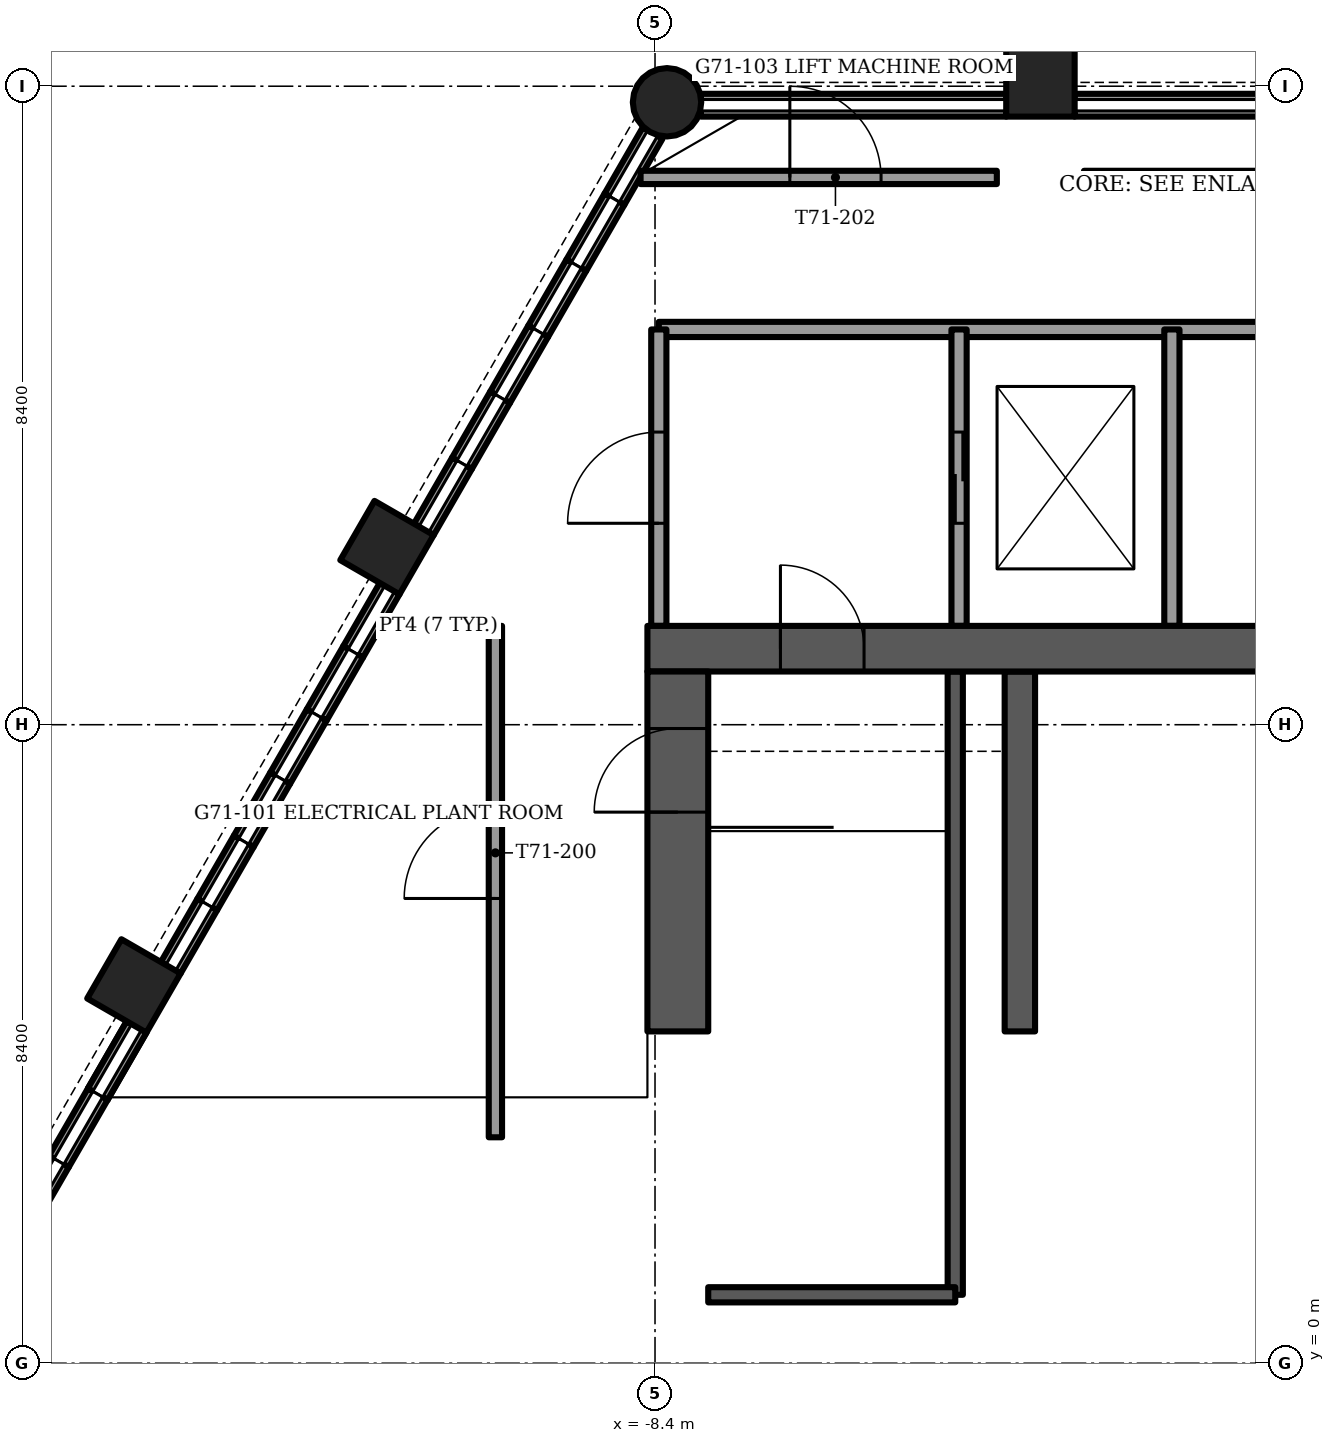
"""IFC4 building model, lengths in metres.
Left out: names, types, materials, properties, quantities, classifications, styles, units other than length and angle.
Written with IfcOpenShell. Run it as: python <this file> out.ifc"""

import sys

from ifc_helpers import new_model, si_unit, direction, frame, frame_2d, origin, origin_2d, place, context, subcontext, project, spatial, rectangle, circle, extrude, element, fill, save


model = new_model("IFC4")
c1 = context("Model", 3, precision=1e-05, world=origin(), true_north=direction((0.0, 1.0)))
c2 = subcontext(c1, "Body", "Model", "MODEL_VIEW")
j1 = project(units=[si_unit("LENGTHUNIT", "METRE"), si_unit("PLANEANGLEUNIT", "RADIAN")], contexts=[c1])
p1 = place(None, origin())
s1 = spatial("IfcSite", under=j1, at=p1, CompositionType="ELEMENT")
p2 = place(p1, origin())
s2 = spatial("IfcBuilding", under=s1, at=p2, CompositionType="ELEMENT")
p3 = place(p2, frame((0.0, 0.0, 288.5)))
s3 = spatial("IfcBuildingStorey", under=s2, at=p3, CompositionType="ELEMENT", Elevation=288.5)
p4 = place(p3, frame((-8.5, 9.4, -0.3), z_axis=(0.0, 0.0, 1.0), x_axis=(1.0, 0.0, 0.0)))
e1 = element("IfcWall", 1, at=p4, inside=s3, PredefinedType="SHEAR", context=c2, shape_type="SweptSolid", body=[
    extrude(rectangle(XDim=17.0, YDim=0.6, at=frame_2d((8.5, 0.0))), origin(), (0.0, 0.0, 1.0), 4.5),
])
p5 = place(p4, frame((1.75, 0.0, 0.0)))
e2 = element("IfcOpeningElement", 2, at=p5, cuts=e1, PredefinedType="OPENING", context=c2, shape_type="SweptSolid", body=[
    extrude(rectangle(XDim=1.1, YDim=2.1, at=frame_2d((0.55, 1.05))), frame((0.0, 0.3, 0.0), z_axis=(0.0, -1.0, 0.0), x_axis=(1.0, 0.0, 0.0)), (0.0, 0.0, 1.0), 0.6),
])
p6 = place(p4, frame((14.15, 0.0, 0.0)))
e3 = element("IfcOpeningElement", 3, at=p6, cuts=e1, PredefinedType="OPENING", context=c2, shape_type="SweptSolid", body=[
    extrude(rectangle(XDim=1.1, YDim=2.1, at=frame_2d((0.55, 1.05))), frame((0.0, 0.3, 0.0), z_axis=(0.0, -1.0, 0.0), x_axis=(1.0, 0.0, 0.0)), (0.0, 0.0, 1.0), 0.6),
])
p7 = place(p3, frame((-8.1, 4.365, -0.3), z_axis=(0.0, 0.0, 1.0), x_axis=(0.0, 1.0, 0.0)))
e4 = element("IfcWall", 4, at=p7, inside=s3, PredefinedType="SHEAR", context=c2, shape_type="SweptSolid", body=[
    extrude(rectangle(XDim=4.735, YDim=0.8, at=frame_2d((2.368, 0.0))), origin(), (0.0, 0.0, 1.0), 4.5),
])
p8 = place(p7, frame((2.885, 0.0, 0.0)))
e5 = element("IfcOpeningElement", 5, at=p8, cuts=e4, PredefinedType="OPENING", context=c2, shape_type="SweptSolid", body=[
    extrude(rectangle(XDim=1.1, YDim=2.1, at=frame_2d((0.55, 1.05))), frame((0.0, 0.4, 0.0), z_axis=(0.0, -1.0, 0.0), x_axis=(1.0, 0.0, 0.0)), (0.0, 0.0, 1.0), 0.8),
])
p9 = place(p3, frame((-3.6, 4.365, -0.3), z_axis=(0.0, 0.0, 1.0), x_axis=(0.0, 1.0, 0.0)))
e6 = element("IfcWall", 6, at=p9, inside=s3, PredefinedType="SHEAR", context=c2, shape_type="SweptSolid", body=[
    extrude(rectangle(XDim=4.735, YDim=0.4, at=frame_2d((2.368, 0.0))), origin(), (0.0, 0.0, 1.0), 4.5),
])
p10 = place(p3, frame((-8.242, 16.589, -1.2), z_axis=(0.0, 0.0, 1.0), x_axis=(1.0, 0.0, 0.0)))
e7 = element("IfcColumn", 7, at=p10, inside=s3, PredefinedType="COLUMN", context=c2, shape_type="SweptSolid", body=[
    extrude(circle(Radius=0.45, at=origin_2d()), origin(), (0.0, 0.0, 1.0), 4.5),
])
for number, where, z_axis, x_axis in (
    (8, (-3.329, 16.85, -1.2), (0.0, 0.0, 1.0), (1.0, 0.0, 0.0)),
    (9, (-11.926, 10.73, -1.2), (0.0, 0.0, 1.0), (0.5, 0.866, 0.0)),
    (10, (-15.256, 4.963, -1.2), (0.0, 0.0, 1.0), (0.5, 0.866, 0.0)),
):
    element("IfcColumn", number, at=place(p3, frame(where, z_axis=z_axis, x_axis=x_axis)), inside=s3, PredefinedType="COLUMN", context=c2, shape_type="SweptSolid", body=[
        extrude(rectangle(XDim=0.9, YDim=0.9, at=origin_2d()), origin(), (0.0, 0.0, 1.0), 4.5),
    ])
p11 = place(p3, frame((2.879, 16.55, 0.0), z_axis=(0.0, 0.0, 1.0), x_axis=(-1.0, 0.0, 0.0)))
e11 = element("IfcWall", 11, at=p11, inside=s3, PredefinedType="SOLIDWALL", context=c2, shape_type="SweptSolid", body=[
    extrude(rectangle(XDim=5.759, YDim=0.3, at=frame_2d((2.879, 0.0))), origin(), (0.0, 0.0, 1.0), 1.0),
])
p12 = place(p3, frame((-3.779, 16.55, 0.0), z_axis=(0.0, 0.0, 1.0), x_axis=(-1.0, 0.0, 0.0)))
e12 = element("IfcWall", 12, at=p12, inside=s3, PredefinedType="SOLIDWALL", context=c2, shape_type="SweptSolid", body=[
    extrude(rectangle(XDim=4.017, YDim=0.3, at=frame_2d((2.008, 0.0))), origin(), (0.0, 0.0, 1.0), 1.0),
])
p13 = place(p3, frame((-8.432, 16.182, 0.0), z_axis=(0.0, 0.0, 1.0), x_axis=(-0.500143783026, -0.865942374699, 0.0)))
e13 = element("IfcWall", 13, at=p13, inside=s3, PredefinedType="SOLIDWALL", context=c2, shape_type="SweptSolid", body=[
    extrude(rectangle(XDim=1.003, YDim=0.3, at=frame_2d((0.501, 0.0))), origin(), (0.0, 0.0, 1.0), 1.0),
])
p14 = place(p3, frame((-8.934, 15.314, 0.0), z_axis=(0.0, 0.0, 1.0), x_axis=(-0.500038395149, -0.8660032352, 0.0)))
e14 = element("IfcWall", 14, at=p14, inside=s3, PredefinedType="SOLIDWALL", context=c2, shape_type="SweptSolid", body=[
    extrude(rectangle(XDim=1.003, YDim=0.3, at=frame_2d((0.502, 0.0))), origin(), (0.0, 0.0, 1.0), 1.0),
])
p15 = place(p3, frame((-9.435, 14.445, 0.0), z_axis=(0.0, 0.0, 1.0), x_axis=(-0.499961250474, -0.866047774678, 0.0)))
e15 = element("IfcWall", 15, at=p15, inside=s3, PredefinedType="SOLIDWALL", context=c2, shape_type="SweptSolid", body=[
    extrude(rectangle(XDim=1.003, YDim=0.3, at=frame_2d((0.501, 0.0))), origin(), (0.0, 0.0, 1.0), 1.0),
])
for number, where, z_axis, x_axis in (
    (16, (-9.937, 13.576, 0.0), (0.0, 0.0, 1.0), (-0.5, -0.866, 0.0)),
    (17, (-10.438, 12.707, 0.0), (0.0, 0.0, 1.0), (-0.5, -0.866, 0.0)),
    (18, (-10.94, 11.839, 0.0), (0.0, 0.0, 1.0), (-0.5, -0.866, 0.0)),
):
    element("IfcWall", number, at=place(p3, frame(where, z_axis=z_axis, x_axis=x_axis)), inside=s3, PredefinedType="SOLIDWALL", context=c2, shape_type="SweptSolid", body=[
        extrude(rectangle(XDim=1.003, YDim=0.3, at=frame_2d((0.501, 0.0))), origin(), (0.0, 0.0, 1.0), 1.0),
    ])
for number, where, z_axis, x_axis in (
    (19, (-11.892, 10.19, 0.0), (0.0, 0.0, 1.0), (-0.5, -0.866, 0.0)),
    (20, (-12.371, 9.359, 0.0), (0.0, 0.0, 1.0), (-0.5, -0.866, 0.0)),
):
    element("IfcWall", number, at=place(p3, frame(where, z_axis=z_axis, x_axis=x_axis)), inside=s3, PredefinedType="SOLIDWALL", context=c2, shape_type="SweptSolid", body=[
        extrude(rectangle(XDim=0.96, YDim=0.3, at=frame_2d((0.48, 0.0))), origin(), (0.0, 0.0, 1.0), 1.0),
    ])
p16 = place(p3, frame((-12.851, 8.528, 0.0), z_axis=(0.0, 0.0, 1.0), x_axis=(-0.500023335103, -0.866011930837, 0.0)))
e21 = element("IfcWall", 21, at=p16, inside=s3, PredefinedType="SOLIDWALL", context=c2, shape_type="SweptSolid", body=[
    extrude(rectangle(XDim=0.96, YDim=0.3, at=frame_2d((0.48, 0.0))), origin(), (0.0, 0.0, 1.0), 1.0),
])
p17 = place(p3, frame((-13.331, 7.697, 0.0), z_axis=(0.0, 0.0, 1.0), x_axis=(-0.499832553123, -0.866122057702, 0.0)))
e22 = element("IfcWall", 22, at=p17, inside=s3, PredefinedType="SOLIDWALL", context=c2, shape_type="SweptSolid", body=[
    extrude(rectangle(XDim=0.96, YDim=0.3, at=frame_2d((0.48, 0.0))), origin(), (0.0, 0.0, 1.0), 1.0),
])
p18 = place(p3, frame((-13.811, 6.865, 0.0), z_axis=(0.0, 0.0, 1.0), x_axis=(-0.500023335103, -0.866011930837, 0.0)))
e23 = element("IfcWall", 23, at=p18, inside=s3, PredefinedType="SOLIDWALL", context=c2, shape_type="SweptSolid", body=[
    extrude(rectangle(XDim=0.96, YDim=0.3, at=frame_2d((0.48, 0.0))), origin(), (0.0, 0.0, 1.0), 1.0),
])
p19 = place(p3, frame((-14.291, 6.034, 0.0), z_axis=(0.0, 0.0, 1.0), x_axis=(-0.500133489192, -0.865948320045, 0.0)))
e24 = element("IfcWall", 24, at=p19, inside=s3, PredefinedType="SOLIDWALL", context=c2, shape_type="SweptSolid", body=[
    extrude(rectangle(XDim=0.96, YDim=0.3, at=frame_2d((0.48, 0.0))), origin(), (0.0, 0.0, 1.0), 1.0),
])
p20 = place(p3, frame((-15.221, 4.424, 0.0), z_axis=(0.0, 0.0, 1.0), x_axis=(-0.500046605208, -0.865998494583, 0.0)))
e25 = element("IfcWall", 25, at=p20, inside=s3, PredefinedType="SOLIDWALL", context=c2, shape_type="SweptSolid", body=[
    extrude(rectangle(XDim=1.021, YDim=0.3, at=frame_2d((0.511, 0.0))), origin(), (0.0, 0.0, 1.0), 1.0),
])
p21 = place(p3, frame((-15.221, 4.424, 3.3), z_axis=(0.0, 0.0, 1.0), x_axis=(-0.500046605208, -0.865998494583, 0.0)))
e26 = element("IfcWall", 26, at=p21, inside=s3, PredefinedType="SOLIDWALL", context=c2, shape_type="SweptSolid", body=[
    extrude(rectangle(XDim=1.021, YDim=0.3, at=frame_2d((0.511, 0.0))), origin(), (0.0, 0.0, 1.0), 0.839),
])
for number, where, z_axis, x_axis in (
    (27, (-15.732, 3.539, 0.0), (0.0, 0.0, 1.0), (-0.5, -0.866, 0.0)),
    (28, (-16.242, 2.654, 0.0), (0.0, 0.0, 1.0), (-0.5, -0.866, 0.0)),
):
    element("IfcWall", number, at=place(p3, frame(where, z_axis=z_axis, x_axis=x_axis)), inside=s3, PredefinedType="SOLIDWALL", context=c2, shape_type="SweptSolid", body=[
        extrude(rectangle(XDim=1.021, YDim=0.3, at=frame_2d((0.511, 0.0))), origin(), (0.0, 0.0, 1.0), 1.0),
    ])
p22 = place(p3, frame((-11.996, 9.7, 0.0), z_axis=(0.0, 0.0, 1.0), x_axis=(1.0, 0.0, 0.0)))
e29 = element("IfcWall", 29, at=p22, inside=s3, PredefinedType="PARTITIONING", context=c2, shape_type="SweptSolid", body=[
    extrude(rectangle(XDim=1.496, YDim=0.175, at=frame_2d((0.748, 0.0))), origin(), (0.0, 0.0, 1.0), 4.2),
])
p23 = place(p3, frame((-8.59, 15.6, 0.0), z_axis=(0.0, 0.0, 1.0), x_axis=(1.0, 0.0, 0.0)))
e30 = element("IfcWall", 30, at=p23, inside=s3, PredefinedType="PARTITIONING", context=c2, shape_type="SweptSolid", body=[
    extrude(rectangle(XDim=4.687, YDim=0.175, at=frame_2d((2.344, 0.0))), origin(), (0.0, 0.0, 1.0), 4.2),
])
p24 = place(p23, frame((1.964, 0.0, 0.0)))
e31 = element("IfcOpeningElement", 31, at=p24, cuts=e30, PredefinedType="OPENING", context=c2, shape_type="SweptSolid", body=[
    extrude(rectangle(XDim=1.2, YDim=2.1, at=frame_2d((0.6, 1.05))), frame((0.0, 0.087, 0.0), z_axis=(0.0, -1.0, 0.0), x_axis=(1.0, 0.0, 0.0)), (0.0, 0.0, 1.0), 0.175),
])
p25 = place(p3, frame((-2.756, 15.6, 0.0), z_axis=(0.0, 0.0, 1.0), x_axis=(1.0, 0.0, 0.0)))
e32 = element("IfcWall", 32, at=p25, inside=s3, PredefinedType="PARTITIONING", context=c2, shape_type="SweptSolid", body=[
    extrude(rectangle(XDim=5.512, YDim=0.175, at=frame_2d((2.756, 0.0))), origin(), (0.0, 0.0, 1.0), 4.2),
])
p26 = place(p3, frame((-10.5, 2.972, 0.0), z_axis=(0.0, 0.0, 1.0), x_axis=(0.0, 1.0, 0.0)))
e33 = element("IfcWall", 33, at=p26, inside=s3, PredefinedType="PARTITIONING", context=c2, shape_type="SweptSolid", body=[
    extrude(rectangle(XDim=6.728, YDim=0.175, at=frame_2d((3.364, 0.0))), origin(), (0.0, 0.0, 1.0), 4.155),
])
p27 = place(p26, frame((3.142, 0.0, 0.0)))
e34 = element("IfcOpeningElement", 34, at=p27, cuts=e33, PredefinedType="OPENING", context=c2, shape_type="SweptSolid", body=[
    extrude(rectangle(XDim=1.2, YDim=2.1, at=frame_2d((0.6, 1.05))), frame((0.0, 0.087, 0.0), z_axis=(0.0, -1.0, 0.0), x_axis=(1.0, 0.0, 0.0)), (0.0, 0.0, 1.0), 0.175),
])
p28 = place(p3, frame((-4.45, 0.9, -0.3), z_axis=(0.0, 0.0, 1.0), x_axis=(0.0, 1.0, 0.0)))
e35 = element("IfcWall", 35, at=p28, inside=s3, PredefinedType="SOLIDWALL", context=c2, shape_type="SweptSolid", body=[
    extrude(rectangle(XDim=8.2, YDim=0.2, at=frame_2d((4.1, 0.0))), origin(), (0.0, 0.0, 1.0), 4.5),
])
p29 = place(p3, frame((-7.7, 0.9, -0.3), z_axis=(0.0, 0.0, 1.0), x_axis=(1.0, 0.0, 0.0)))
e36 = element("IfcWall", 36, at=p29, inside=s3, PredefinedType="SOLIDWALL", context=c2, shape_type="SweptSolid", body=[
    extrude(rectangle(XDim=3.25, YDim=0.2, at=frame_2d((1.625, 0.0))), origin(), (0.0, 0.0, 1.0), 4.5),
])
p30 = place(p3, frame((-8.35, 13.6, 0.0), z_axis=(0.0, 0.0, 1.0), x_axis=(1.0, 0.0, 0.0)))
e37 = element("IfcWall", 37, at=p30, inside=s3, PredefinedType="PARTITIONING", context=c2, shape_type="SweptSolid", body=[
    extrude(rectangle(XDim=16.7, YDim=0.2, at=frame_2d((8.35, 0.0))), origin(), (0.0, 0.0, 1.0), 4.2),
])
p31 = place(p3, frame((-8.35, 9.7, 0.0), z_axis=(0.0, 0.0, 1.0), x_axis=(0.0, 1.0, 0.0)))
e38 = element("IfcWall", 38, at=p31, inside=s3, PredefinedType="PARTITIONING", context=c2, shape_type="SweptSolid", body=[
    extrude(rectangle(XDim=3.9, YDim=0.2, at=frame_2d((1.95, 0.0))), origin(), (0.0, 0.0, 1.0), 4.2),
])
p32 = place(p31, frame((1.35, 0.0, 0.0)))
e39 = element("IfcOpeningElement", 39, at=p32, cuts=e38, PredefinedType="OPENING", context=c2, shape_type="SweptSolid", body=[
    extrude(rectangle(XDim=1.2, YDim=2.1, at=frame_2d((0.6, 1.05))), frame((0.0, 0.1, 0.0), z_axis=(0.0, -1.0, 0.0), x_axis=(1.0, 0.0, 0.0)), (0.0, 0.0, 1.0), 0.2),
])
p33 = place(p3, frame((-4.4, 9.7, 0.0), z_axis=(0.0, 0.0, 1.0), x_axis=(0.0, 1.0, 0.0)))
e40 = element("IfcWall", 40, at=p33, inside=s3, PredefinedType="PARTITIONING", context=c2, shape_type="SweptSolid", body=[
    extrude(rectangle(XDim=3.9, YDim=0.2, at=frame_2d((1.95, 0.0))), origin(), (0.0, 0.0, 1.0), 4.2),
])
p34 = place(p33, frame((1.35, 0.0, 0.0)))
e41 = element("IfcOpeningElement", 41, at=p34, cuts=e40, PredefinedType="OPENING", context=c2, shape_type="SweptSolid", body=[
    extrude(rectangle(XDim=1.2, YDim=2.1, at=frame_2d((0.6, 1.05))), frame((0.0, 0.1, 0.0), z_axis=(0.0, -1.0, 0.0), x_axis=(1.0, 0.0, 0.0)), (0.0, 0.0, 1.0), 0.2),
])
p35 = place(p3, frame((-1.6, 9.7, 0.0), z_axis=(0.0, 0.0, 1.0), x_axis=(0.0, 1.0, 0.0)))
e42 = element("IfcWall", 42, at=p35, inside=s3, PredefinedType="PARTITIONING", context=c2, shape_type="SweptSolid", body=[
    extrude(rectangle(XDim=3.9, YDim=0.2, at=frame_2d((1.95, 0.0))), origin(), (0.0, 0.0, 1.0), 4.2),
])
p36 = place(p27, origin())
e43 = element("IfcDoor", 43, at=p36, inside=s3, OperationType="SINGLE_SWING_RIGHT", PredefinedType="DOOR", context=c2, shape_type="SweptSolid", body=[
    extrude(rectangle(XDim=1.2, YDim=2.1, at=frame_2d((0.6, 1.05))), frame((0.0, 0.025, 0.0), z_axis=(0.0, -1.0, 0.0), x_axis=(1.0, 0.0, 0.0)), (0.0, 0.0, 1.0), 0.05),
])
fill(e34, e43)
p37 = place(p24, origin())
e44 = element("IfcDoor", 44, at=p37, inside=s3, OperationType="SINGLE_SWING_RIGHT", PredefinedType="DOOR", context=c2, shape_type="SweptSolid", body=[
    extrude(rectangle(XDim=1.2, YDim=2.1, at=frame_2d((0.6, 1.05))), frame((0.0, 0.025, 0.0), z_axis=(0.0, -1.0, 0.0), x_axis=(1.0, 0.0, 0.0)), (0.0, 0.0, 1.0), 0.05),
])
fill(e31, e44)
p38 = place(p5, origin())
e45 = element("IfcDoor", 45, at=p38, inside=s3, OperationType="SINGLE_SWING_LEFT", PredefinedType="DOOR", context=c2, shape_type="SweptSolid", body=[
    extrude(rectangle(XDim=1.1, YDim=2.1, at=frame_2d((0.55, 1.05))), frame((0.0, 0.025, 0.0), z_axis=(0.0, -1.0, 0.0), x_axis=(1.0, 0.0, 0.0)), (0.0, 0.0, 1.0), 0.05),
])
fill(e2, e45)
p39 = place(p8, origin())
e46 = element("IfcDoor", 46, at=p39, inside=s3, OperationType="SINGLE_SWING_RIGHT", PredefinedType="DOOR", context=c2, shape_type="SweptSolid", body=[
    extrude(rectangle(XDim=1.1, YDim=2.1, at=frame_2d((0.55, 1.05))), frame((0.0, 0.025, 0.0), z_axis=(0.0, -1.0, 0.0), x_axis=(1.0, 0.0, 0.0)), (0.0, 0.0, 1.0), 0.05),
])
fill(e5, e46)
p40 = place(p34, origin())
e47 = element("IfcDoor", 47, at=p40, inside=s3, OperationType="SLIDING_TO_LEFT", PredefinedType="DOOR", context=c2, shape_type="SweptSolid", body=[
    extrude(rectangle(XDim=1.2, YDim=2.1, at=frame_2d((0.6, 1.05))), frame((0.0, 0.025, 0.0), z_axis=(0.0, -1.0, 0.0), x_axis=(1.0, 0.0, 0.0)), (0.0, 0.0, 1.0), 0.05),
])
fill(e41, e47)
p41 = place(p32, origin())
e48 = element("IfcDoor", 48, at=p41, inside=s3, OperationType="SINGLE_SWING_LEFT", PredefinedType="DOOR", context=c2, shape_type="SweptSolid", body=[
    extrude(rectangle(XDim=1.2, YDim=2.1, at=frame_2d((0.6, 1.05))), frame((0.0, 0.025, 0.0), z_axis=(0.0, -1.0, 0.0), x_axis=(1.0, 0.0, 0.0)), (0.0, 0.0, 1.0), 0.05),
])
fill(e39, e48)
save(model, sys.argv[1])
